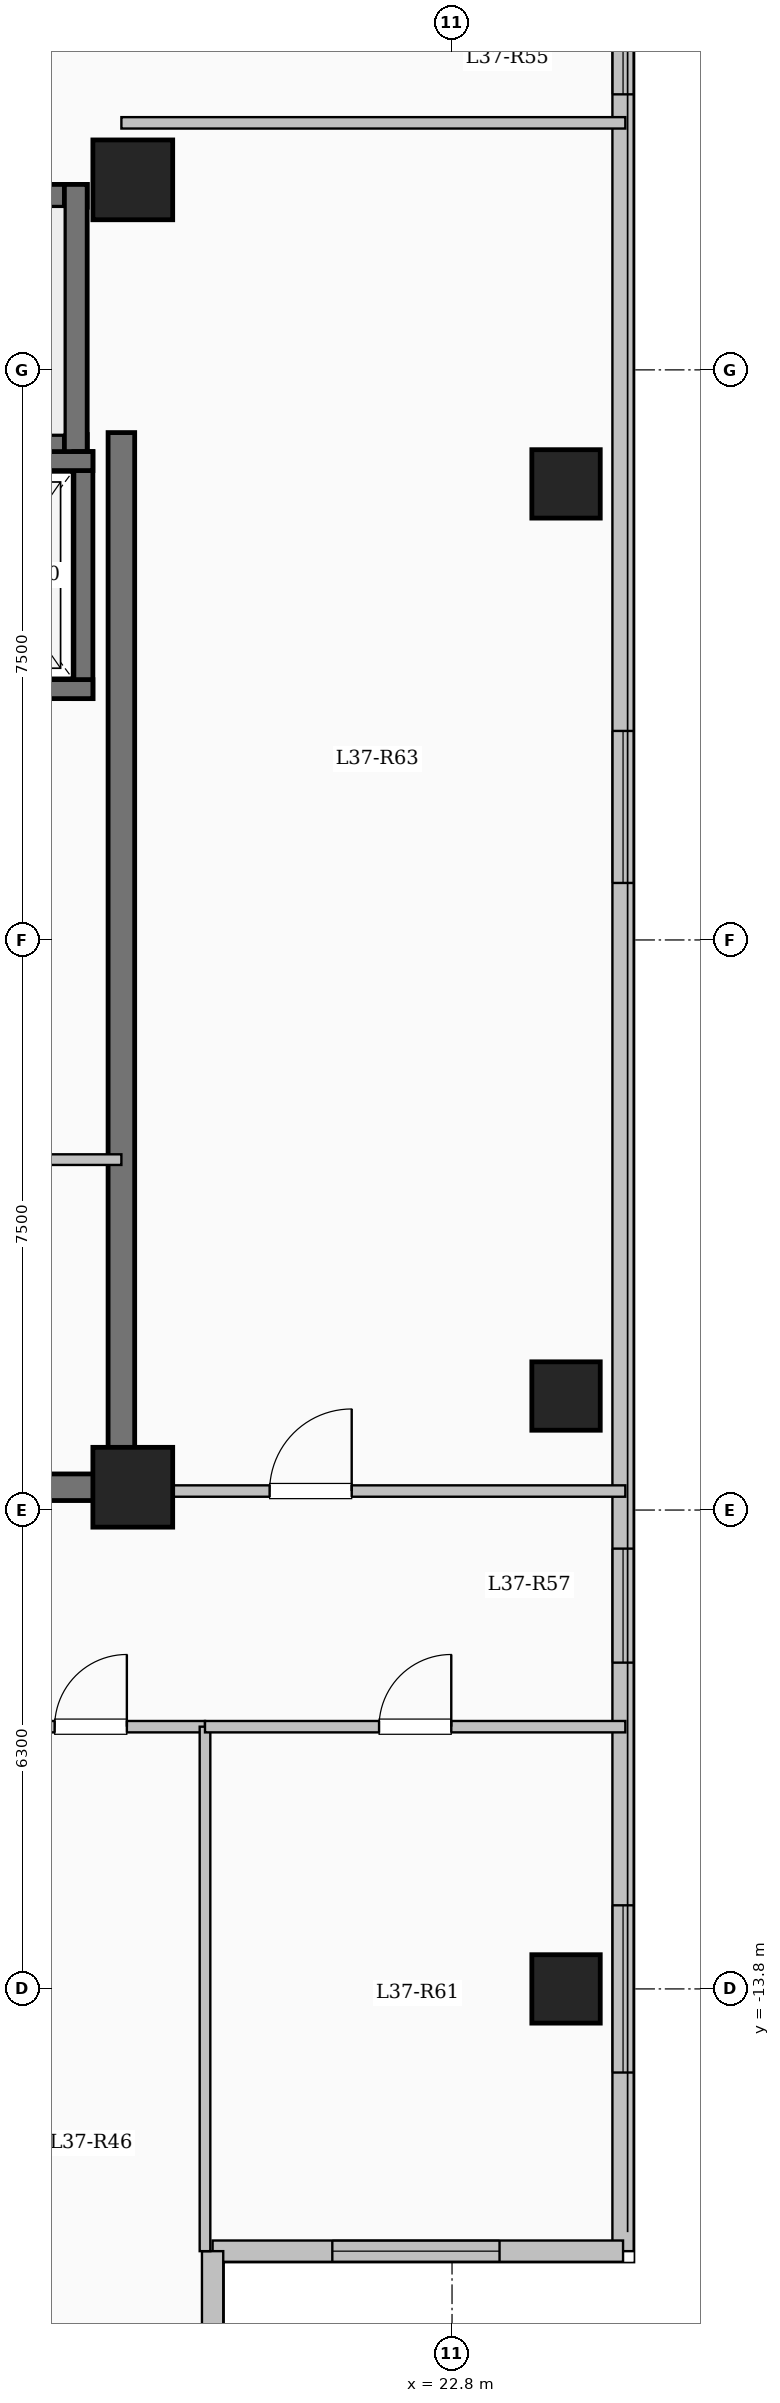
"""IFC4 building model, lengths in metres.
Left out: names, types, materials, properties, quantities, classifications, styles, units other than length and angle.
Written with IfcOpenShell. Run it as: python <this file> out.ifc"""

import sys

from ifc_helpers import new_model, si_unit, direction, frame, frame_2d, origin, origin_2d, place, context, subcontext, project, spatial, rectangle, extrude, element, fill, save


model = new_model("IFC4")
c1 = context("Model", 3, precision=1e-05, world=origin(), true_north=direction((0.0, 1.0)))
c2 = subcontext(c1, "Body", "Model", "MODEL_VIEW")
j1 = project(units=[si_unit("LENGTHUNIT", "METRE"), si_unit("PLANEANGLEUNIT", "RADIAN")], contexts=[c1])
p1 = place(None, origin())
s1 = spatial("IfcSite", under=j1, at=p1, CompositionType="ELEMENT")
p2 = place(p1, origin())
s2 = spatial("IfcBuilding", under=s1, at=p2, CompositionType="ELEMENT")
p3 = place(p2, frame((0.0, 0.0, 139.3)))
s3 = spatial("IfcBuildingStorey", under=s2, at=p3, CompositionType="ELEMENT", Elevation=139.3)
for number, where, z_axis, x_axis in (
    (1, (18.6, -7.2, 0.0), (0.0, 0.0, 1.0), (1.0, 0.0, 0.0)),
    (2, (18.6, 10.0, 0.0), (0.0, 0.0, 1.0), (1.0, 0.0, 0.0)),
):
    element("IfcColumn", number, at=place(p3, frame(where, z_axis=z_axis, x_axis=x_axis)), inside=s3, PredefinedType="COLUMN", context=c2, shape_type="SweptSolid", body=[
        extrude(rectangle(XDim=1.05, YDim=1.05, at=origin_2d()), origin(), (0.0, 0.0, 1.0), 3.35),
    ])
for number, where, z_axis, x_axis in (
    (3, (24.3, -13.8, 0.0), (0.0, 0.0, 1.0), (1.0, 0.0, 0.0)),
    (4, (24.3, -6.0, 0.0), (0.0, 0.0, 1.0), (1.0, 0.0, 0.0)),
    (5, (24.3, 6.0, 0.0), (0.0, 0.0, 1.0), (1.0, 0.0, 0.0)),
):
    element("IfcColumn", number, at=place(p3, frame(where, z_axis=z_axis, x_axis=x_axis)), inside=s3, PredefinedType="COLUMN", context=c2, shape_type="SweptSolid", body=[
        extrude(rectangle(XDim=0.9, YDim=0.9, at=origin_2d()), origin(), (0.0, 0.0, 1.0), 3.35),
    ])
p4 = place(p3, frame((25.05, 17.25, 0.0), z_axis=(0.0, 0.0, 1.0), x_axis=(0.0, -1.0, 0.0)))
e6 = element("IfcWall", 6, at=p4, inside=s3, PredefinedType="SOLIDWALL", context=c2, shape_type="SweptSolid", body=[
    extrude(rectangle(XDim=34.5, YDim=0.28, at=frame_2d((17.25, 0.0))), origin(), (0.0, 0.0, 1.0), 3.1),
])
p5 = place(p4, frame((1.375, 0.0, 0.9)))
e7 = element("IfcOpeningElement", 7, at=p5, cuts=e6, PredefinedType="OPENING", context=c2, shape_type="SweptSolid", body=[
    extrude(rectangle(XDim=2.0, YDim=1.7, at=frame_2d((1.0, 0.85))), frame((0.0, 0.15, 0.0), z_axis=(0.0, -1.0, 0.0), x_axis=(1.0, 0.0, 0.0)), (0.0, 0.0, 1.0), 0.3),
])
p6 = place(p4, frame((5.125, 0.0, 0.95)))
e8 = element("IfcOpeningElement", 8, at=p6, cuts=e6, PredefinedType="OPENING", context=c2, shape_type="SweptSolid", body=[
    extrude(rectangle(XDim=1.0, YDim=1.5, at=frame_2d((0.5, 0.75))), frame((0.0, 0.15, 0.0), z_axis=(0.0, -1.0, 0.0), x_axis=(1.0, 0.0, 0.0)), (0.0, 0.0, 1.0), 0.3),
])
p7 = place(p4, frame((14.5, 0.0, 0.9)))
e9 = element("IfcOpeningElement", 9, at=p7, cuts=e6, PredefinedType="OPENING", context=c2, shape_type="SweptSolid", body=[
    extrude(rectangle(XDim=2.0, YDim=1.7, at=frame_2d((1.0, 0.85))), frame((0.0, 0.15, 0.0), z_axis=(0.0, -1.0, 0.0), x_axis=(1.0, 0.0, 0.0)), (0.0, 0.0, 1.0), 0.3),
])
p8 = place(p4, frame((25.258, 0.0, 0.9)))
e10 = element("IfcOpeningElement", 10, at=p8, cuts=e6, PredefinedType="OPENING", context=c2, shape_type="SweptSolid", body=[
    extrude(rectangle(XDim=1.5, YDim=1.65, at=frame_2d((0.75, 0.825))), frame((0.0, 0.15, 0.0), z_axis=(0.0, -1.0, 0.0), x_axis=(1.0, 0.0, 0.0)), (0.0, 0.0, 1.0), 0.3),
])
p9 = place(p4, frame((29.95, 0.0, 0.9)))
e11 = element("IfcOpeningElement", 11, at=p9, cuts=e6, PredefinedType="OPENING", context=c2, shape_type="SweptSolid", body=[
    extrude(rectangle(XDim=2.2, YDim=1.75, at=frame_2d((1.1, 0.875))), frame((0.0, 0.15, 0.0), z_axis=(0.0, -1.0, 0.0), x_axis=(1.0, 0.0, 0.0)), (0.0, 0.0, 1.0), 0.3),
])
p10 = place(p3, frame((25.05, -17.25, 0.0), z_axis=(0.0, 0.0, 1.0), x_axis=(-1.0, 0.0, 0.0)))
e12 = element("IfcWall", 12, at=p10, inside=s3, PredefinedType="SOLIDWALL", context=c2, shape_type="SweptSolid", body=[
    extrude(rectangle(XDim=5.4, YDim=0.28, at=frame_2d((2.7, 0.0))), origin(), (0.0, 0.0, 1.0), 3.1),
])
p11 = place(p10, frame((1.625, 0.0, 0.9)))
e13 = element("IfcOpeningElement", 13, at=p11, cuts=e12, PredefinedType="OPENING", context=c2, shape_type="SweptSolid", body=[
    extrude(rectangle(XDim=2.2, YDim=1.75, at=frame_2d((1.1, 0.875))), frame((0.0, 0.15, 0.0), z_axis=(0.0, -1.0, 0.0), x_axis=(1.0, 0.0, 0.0)), (0.0, 0.0, 1.0), 0.3),
])
p12 = place(p3, frame((19.65, -17.25, 0.0), z_axis=(0.0, 0.0, 1.0), x_axis=(0.0, -1.0, 0.0)))
e14 = element("IfcWall", 14, at=p12, inside=s3, PredefinedType="SOLIDWALL", context=c2, shape_type="SweptSolid", body=[
    extrude(rectangle(XDim=3.9, YDim=0.28, at=frame_2d((1.95, 0.0))), origin(), (0.0, 0.0, 1.0), 3.1),
])
p13 = place(p12, frame((1.35, 0.0, 0.95)))
e15 = element("IfcOpeningElement", 15, at=p13, cuts=e14, PredefinedType="OPENING", context=c2, shape_type="SweptSolid", body=[
    extrude(rectangle(XDim=1.2, YDim=1.5, at=frame_2d((0.6, 0.75))), frame((0.0, 0.15, 0.0), z_axis=(0.0, -1.0, 0.0), x_axis=(1.0, 0.0, 0.0)), (0.0, 0.0, 1.0), 0.3),
])
p14 = place(p3, frame((10.0, 9.79, 0.0), z_axis=(0.0, 0.0, 1.0), x_axis=(1.0, 0.0, 0.0)))
e16 = element("IfcWall", 16, at=p14, inside=s3, PredefinedType="SHEAR", context=c2, shape_type="SweptSolid", body=[
    extrude(rectangle(XDim=8.0, YDim=0.3, at=frame_2d((4.0, 0.0))), origin(), (0.0, 0.0, 1.0), 3.35),
])
p15 = place(p3, frame((10.0, 6.5, 0.0), z_axis=(0.0, 0.0, 1.0), x_axis=(1.0, 0.0, 0.0)))
e17 = element("IfcWall", 17, at=p15, inside=s3, PredefinedType="SHEAR", context=c2, shape_type="SweptSolid", body=[
    extrude(rectangle(XDim=8.0, YDim=0.3, at=frame_2d((4.0, 0.0))), origin(), (0.0, 0.0, 1.0), 3.35),
])
p16 = place(p15, frame((0.55, 0.0, 0.0)))
e18 = element("IfcOpeningElement", 18, at=p16, cuts=e17, PredefinedType="OPENING", context=c2, shape_type="SweptSolid", body=[
    extrude(rectangle(XDim=1.0, YDim=2.15, at=frame_2d((0.5, 1.075))), frame((0.0, 0.16, 0.0), z_axis=(0.0, -1.0, 0.0), x_axis=(1.0, 0.0, 0.0)), (0.0, 0.0, 1.0), 0.32),
])
p17 = place(p3, frame((17.85, 6.35, 0.0), z_axis=(0.0, 0.0, 1.0), x_axis=(0.0, 1.0, 0.0)))
e19 = element("IfcWall", 19, at=p17, inside=s3, PredefinedType="SHEAR", context=c2, shape_type="SweptSolid", body=[
    extrude(rectangle(XDim=3.59, YDim=0.3, at=frame_2d((1.795, 0.0))), origin(), (0.0, 0.0, 1.0), 3.35),
])
p18 = place(p3, frame((17.95, 3.175, 0.0), z_axis=(0.0, 0.0, 1.0), x_axis=(0.0, 1.0, 0.0)))
e20 = element("IfcWall", 20, at=p18, inside=s3, PredefinedType="SHEAR", context=c2, shape_type="SweptSolid", body=[
    extrude(rectangle(XDim=3.25, YDim=0.25, at=frame_2d((1.625, 0.0))), origin(), (0.0, 0.0, 1.0), 3.35),
])
for number, where, z_axis, x_axis in (
    (21, (15.525, 3.3, 0.0), (0.0, 0.0, 1.0), (1.0, 0.0, 0.0)),
    (22, (15.525, 6.3, 0.0), (0.0, 0.0, 1.0), (1.0, 0.0, 0.0)),
):
    element("IfcWall", number, at=place(p3, frame(where, z_axis=z_axis, x_axis=x_axis)), inside=s3, PredefinedType="SHEAR", context=c2, shape_type="SweptSolid", body=[
        extrude(rectangle(XDim=2.55, YDim=0.25, at=frame_2d((1.275, 0.0))), origin(), (0.0, 0.0, 1.0), 3.35),
    ])
p19 = place(p3, frame((18.45, -7.375, 0.0), z_axis=(0.0, 0.0, 1.0), x_axis=(0.0, 1.0, 0.0)))
e23 = element("IfcWall", 23, at=p19, inside=s3, PredefinedType="SHEAR", context=c2, shape_type="SweptSolid", body=[
    extrude(rectangle(XDim=14.05, YDim=0.35, at=frame_2d((7.025, 0.0))), origin(), (0.0, 0.0, 1.0), 3.35),
])
p20 = place(p3, frame((10.075, -7.2, 0.0), z_axis=(0.0, 0.0, 1.0), x_axis=(1.0, 0.0, 0.0)))
e24 = element("IfcWall", 24, at=p20, inside=s3, PredefinedType="SHEAR", context=c2, shape_type="SweptSolid", body=[
    extrude(rectangle(XDim=8.55, YDim=0.35, at=frame_2d((4.275, 0.0))), origin(), (0.0, 0.0, 1.0), 3.35),
])
p21 = place(p3, frame((15.4, -2.89, 0.0), z_axis=(0.0, 0.0, 1.0), x_axis=(1.0, 0.0, 0.0)))
e25 = element("IfcWall", 25, at=p21, inside=s3, PredefinedType="PARTITIONING", context=c2, shape_type="SweptSolid", body=[
    extrude(rectangle(XDim=3.05, YDim=0.14, at=frame_2d((1.525, 0.0))), origin(), (0.0, 0.0, 1.0), 3.1),
])
p22 = place(p21, frame((1.05, 0.0, 0.0)))
e26 = element("IfcOpeningElement", 26, at=p22, cuts=e25, PredefinedType="OPENING", context=c2, shape_type="SweptSolid", body=[
    extrude(rectangle(XDim=0.9, YDim=2.08, at=frame_2d((0.45, 1.04))), frame((0.0, 0.08, 0.0), z_axis=(0.0, -1.0, 0.0), x_axis=(1.0, 0.0, 0.0)), (0.0, 0.0, 1.0), 0.16),
])
p23 = place(p3, frame((8.55, -10.35, 0.0), z_axis=(0.0, 0.0, 1.0), x_axis=(1.0, 0.0, 0.0)))
e27 = element("IfcWall", 27, at=p23, inside=s3, PredefinedType="PARTITIONING", context=c2, shape_type="SweptSolid", body=[
    extrude(rectangle(XDim=11.0, YDim=0.15, at=frame_2d((5.5, 0.0))), origin(), (0.0, 0.0, 1.0), 3.1),
])
p24 = place(p23, frame((1.516, 0.0, 0.0)))
e28 = element("IfcOpeningElement", 28, at=p24, cuts=e27, PredefinedType="OPENING", context=c2, shape_type="SweptSolid", body=[
    extrude(rectangle(XDim=0.95, YDim=2.15, at=frame_2d((0.475, 1.075))), frame((0.0, 0.085, 0.0), z_axis=(0.0, -1.0, 0.0), x_axis=(1.0, 0.0, 0.0)), (0.0, 0.0, 1.0), 0.17),
])
p25 = place(p23, frame((5.488, 0.0, 0.0)))
e29 = element("IfcOpeningElement", 29, at=p25, cuts=e27, PredefinedType="OPENING", context=c2, shape_type="SweptSolid", body=[
    extrude(rectangle(XDim=0.95, YDim=2.15, at=frame_2d((0.475, 1.075))), frame((0.0, 0.085, 0.0), z_axis=(0.0, -1.0, 0.0), x_axis=(1.0, 0.0, 0.0)), (0.0, 0.0, 1.0), 0.17),
])
p26 = place(p23, frame((9.022, 0.0, 0.0)))
e30 = element("IfcOpeningElement", 30, at=p26, cuts=e27, PredefinedType="OPENING", context=c2, shape_type="SweptSolid", body=[
    extrude(rectangle(XDim=0.95, YDim=2.15, at=frame_2d((0.475, 1.075))), frame((0.0, 0.085, 0.0), z_axis=(0.0, -1.0, 0.0), x_axis=(1.0, 0.0, 0.0)), (0.0, 0.0, 1.0), 0.17),
])
p27 = place(p3, frame((18.45, -7.25, 0.0), z_axis=(0.0, 0.0, 1.0), x_axis=(1.0, 0.0, 0.0)))
e31 = element("IfcWall", 31, at=p27, inside=s3, PredefinedType="PARTITIONING", context=c2, shape_type="SweptSolid", body=[
    extrude(rectangle(XDim=6.63, YDim=0.15, at=frame_2d((3.315, 0.0))), origin(), (0.0, 0.0, 1.0), 3.1),
])
p28 = place(p27, frame((1.95, 0.0, 0.0)))
e32 = element("IfcOpeningElement", 32, at=p28, cuts=e31, PredefinedType="OPENING", context=c2, shape_type="SweptSolid", body=[
    extrude(rectangle(XDim=1.08, YDim=2.15, at=frame_2d((0.54, 1.075))), frame((0.0, 0.085, 0.0), z_axis=(0.0, -1.0, 0.0), x_axis=(1.0, 0.0, 0.0)), (0.0, 0.0, 1.0), 0.17),
])
p29 = place(p3, frame((18.45, 10.75, 0.0), z_axis=(0.0, 0.0, 1.0), x_axis=(1.0, 0.0, 0.0)))
e33 = element("IfcWall", 33, at=p29, inside=s3, PredefinedType="PARTITIONING", context=c2, shape_type="SweptSolid", body=[
    extrude(rectangle(XDim=6.63, YDim=0.15, at=frame_2d((3.315, 0.0))), origin(), (0.0, 0.0, 1.0), 3.1),
])
p30 = place(p3, frame((19.55, -17.25, 0.0), z_axis=(0.0, 0.0, 1.0), x_axis=(0.0, 1.0, 0.0)))
e34 = element("IfcWall", 34, at=p30, inside=s3, PredefinedType="PARTITIONING", context=c2, shape_type="SweptSolid", body=[
    extrude(rectangle(XDim=6.9, YDim=0.14, at=frame_2d((3.45, 0.0))), origin(), (0.0, 0.0, 1.0), 3.1),
])
p31 = place(p3, frame((19.55, -10.35, 0.0), z_axis=(0.0, 0.0, 1.0), x_axis=(1.0, 0.0, 0.0)))
e35 = element("IfcWall", 35, at=p31, inside=s3, PredefinedType="PARTITIONING", context=c2, shape_type="SweptSolid", body=[
    extrude(rectangle(XDim=5.53, YDim=0.15, at=frame_2d((2.765, 0.0))), origin(), (0.0, 0.0, 1.0), 3.1),
])
p32 = place(p31, frame((2.29, 0.0, 0.0)))
e36 = element("IfcOpeningElement", 36, at=p32, cuts=e35, PredefinedType="OPENING", context=c2, shape_type="SweptSolid", body=[
    extrude(rectangle(XDim=0.95, YDim=2.15, at=frame_2d((0.475, 1.075))), frame((0.0, 0.085, 0.0), z_axis=(0.0, -1.0, 0.0), x_axis=(1.0, 0.0, 0.0)), (0.0, 0.0, 1.0), 0.17),
])
p33 = place(p6, origin())
e37 = element("IfcWindow", 37, at=p33, inside=s3, PartitioningType="SINGLE_PANEL", PredefinedType="WINDOW", context=c2, shape_type="SweptSolid", body=[
    extrude(rectangle(XDim=1.0, YDim=1.5, at=frame_2d((0.5, 0.75))), frame((0.0, 0.03, 0.0), z_axis=(0.0, -1.0, 0.0), x_axis=(1.0, 0.0, 0.0)), (0.0, 0.0, 1.0), 0.06),
])
fill(e8, e37)
p34 = place(p7, origin())
e38 = element("IfcWindow", 38, at=p34, inside=s3, PartitioningType="SINGLE_PANEL", PredefinedType="WINDOW", context=c2, shape_type="SweptSolid", body=[
    extrude(rectangle(XDim=2.0, YDim=1.7, at=frame_2d((1.0, 0.85))), frame((0.0, 0.03, 0.0), z_axis=(0.0, -1.0, 0.0), x_axis=(1.0, 0.0, 0.0)), (0.0, 0.0, 1.0), 0.06),
])
fill(e9, e38)
p35 = place(p8, origin())
e39 = element("IfcWindow", 39, at=p35, inside=s3, PartitioningType="SINGLE_PANEL", PredefinedType="WINDOW", context=c2, shape_type="SweptSolid", body=[
    extrude(rectangle(XDim=1.5, YDim=1.65, at=frame_2d((0.75, 0.825))), frame((0.0, 0.03, 0.0), z_axis=(0.0, -1.0, 0.0), x_axis=(1.0, 0.0, 0.0)), (0.0, 0.0, 1.0), 0.06),
])
fill(e10, e39)
p36 = place(p9, origin())
e40 = element("IfcWindow", 40, at=p36, inside=s3, PartitioningType="SINGLE_PANEL", PredefinedType="WINDOW", context=c2, shape_type="SweptSolid", body=[
    extrude(rectangle(XDim=2.2, YDim=1.75, at=frame_2d((1.1, 0.875))), frame((0.0, 0.03, 0.0), z_axis=(0.0, -1.0, 0.0), x_axis=(1.0, 0.0, 0.0)), (0.0, 0.0, 1.0), 0.06),
])
fill(e11, e40)
p37 = place(p11, origin())
e41 = element("IfcWindow", 41, at=p37, inside=s3, PartitioningType="SINGLE_PANEL", PredefinedType="WINDOW", context=c2, shape_type="SweptSolid", body=[
    extrude(rectangle(XDim=2.2, YDim=1.75, at=frame_2d((1.1, 0.875))), frame((0.0, 0.03, 0.0), z_axis=(0.0, -1.0, 0.0), x_axis=(1.0, 0.0, 0.0)), (0.0, 0.0, 1.0), 0.06),
])
fill(e13, e41)
p38 = place(p26, origin())
e42 = element("IfcDoor", 42, at=p38, inside=s3, OperationType="SINGLE_SWING_RIGHT", PredefinedType="DOOR", context=c2, shape_type="SweptSolid", body=[
    extrude(rectangle(XDim=0.95, YDim=2.15, at=frame_2d((0.475, 1.075))), frame((0.0, 0.025, 0.0), z_axis=(0.0, -1.0, 0.0), x_axis=(1.0, 0.0, 0.0)), (0.0, 0.0, 1.0), 0.05),
])
fill(e30, e42)
p39 = place(p32, origin())
e43 = element("IfcDoor", 43, at=p39, inside=s3, OperationType="SINGLE_SWING_RIGHT", PredefinedType="DOOR", context=c2, shape_type="SweptSolid", body=[
    extrude(rectangle(XDim=0.95, YDim=2.15, at=frame_2d((0.475, 1.075))), frame((0.0, 0.025, 0.0), z_axis=(0.0, -1.0, 0.0), x_axis=(1.0, 0.0, 0.0)), (0.0, 0.0, 1.0), 0.05),
])
fill(e36, e43)
p40 = place(p28, origin())
e44 = element("IfcDoor", 44, at=p40, inside=s3, OperationType="SINGLE_SWING_RIGHT", PredefinedType="DOOR", context=c2, shape_type="SweptSolid", body=[
    extrude(rectangle(XDim=1.08, YDim=2.15, at=frame_2d((0.54, 1.075))), frame((0.0, 0.025, 0.0), z_axis=(0.0, -1.0, 0.0), x_axis=(1.0, 0.0, 0.0)), (0.0, 0.0, 1.0), 0.05),
])
fill(e32, e44)
save(model, sys.argv[1])
